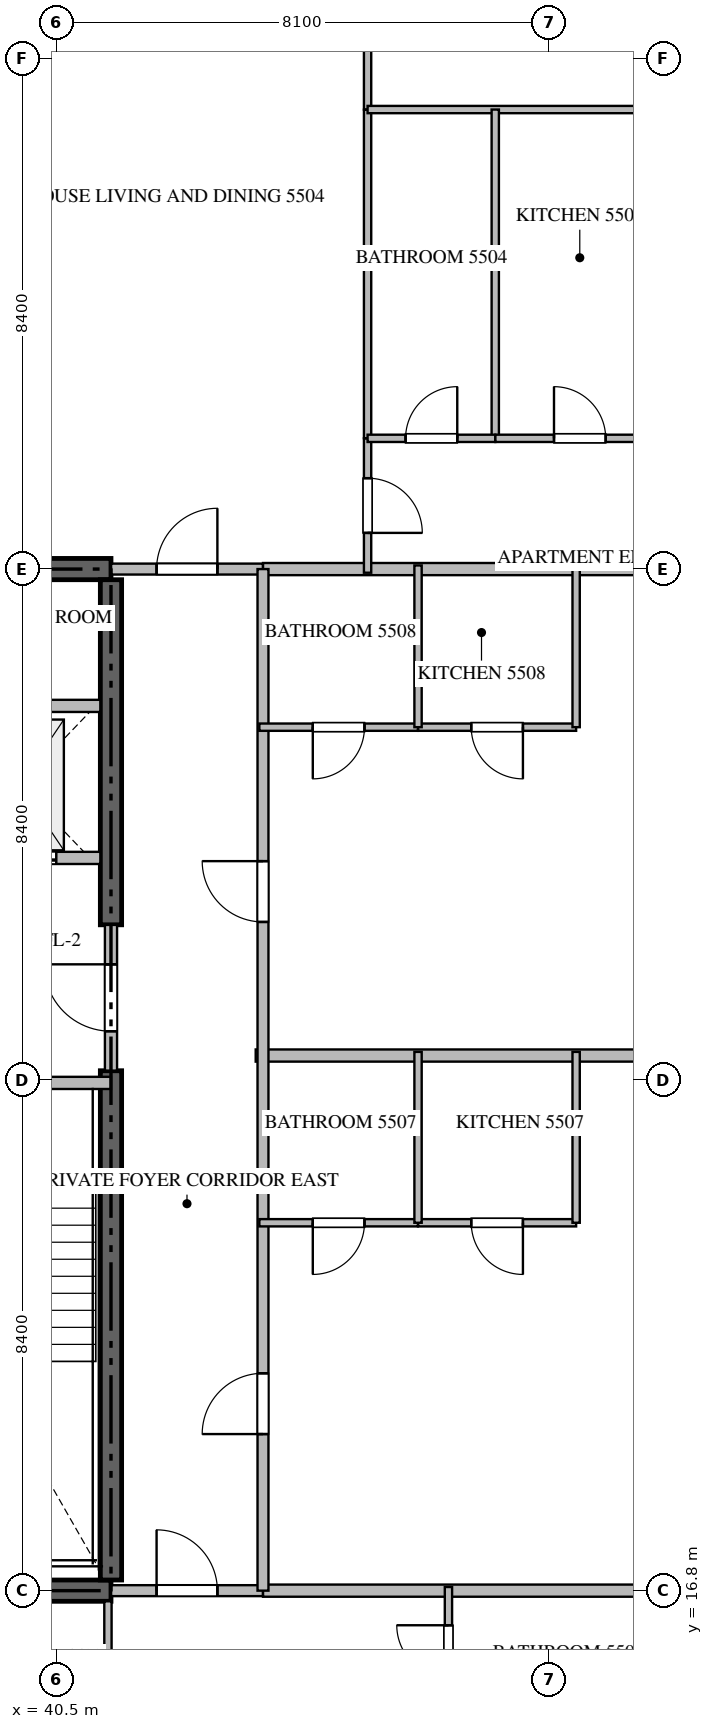
"""IFC4 building model, lengths in metres.
Left out: names, types, materials, properties, quantities, classifications, styles, units other than length and angle.
Written with IfcOpenShell. Run it as: python <this file> out.ifc"""

import sys

from ifc_helpers import new_model, si_unit, direction, frame, frame_2d, origin, place, context, subcontext, project, spatial, rectangle, extrude, source, transform, mapped, element, fill, save


model = new_model("IFC4")
c1 = context("Model", 3, precision=1e-05, world=origin(), true_north=direction((0.0, 1.0)))
c2 = subcontext(c1, "Body", "Model", "MODEL_VIEW")
j1 = project(units=[si_unit("LENGTHUNIT", "METRE"), si_unit("PLANEANGLEUNIT", "RADIAN")], contexts=[c1])
p1 = place(None, origin())
s1 = spatial("IfcSite", under=j1, at=p1, CompositionType="ELEMENT")
p2 = place(p1, origin())
s2 = spatial("IfcBuilding", under=s1, at=p2, CompositionType="ELEMENT")
p3 = place(p2, frame((0.0, 0.0, 222.0)))
s3 = spatial("IfcBuildingStorey", under=s2, at=p3, CompositionType="ELEMENT", Elevation=222.0)
for number, where, z_axis, x_axis in (
    (1, (23.4, 16.8, -0.26), (0.0, 0.0, 1.0), (1.0, 0.0, 0.0)),
    (2, (41.4, 33.6, -0.26), (0.0, 0.0, 1.0), (-1.0, 0.0, 0.0)),
):
    element("IfcWall", number, at=place(p3, frame(where, z_axis=z_axis, x_axis=x_axis)), inside=s3, PredefinedType="SHEAR", context=c2, shape_type="SweptSolid", body=[
        extrude(rectangle(XDim=18.0, YDim=0.35, at=frame_2d((9.0, 0.0))), origin(), (0.0, 0.0, 1.0), 3.848),
    ])
p4 = place(p3, frame((41.4, 16.975, -0.26), z_axis=(0.0, 0.0, 1.0), x_axis=(0.0, 1.0, 0.0)))
e3 = element("IfcWall", 3, at=p4, inside=s3, PredefinedType="SHEAR", context=c2, shape_type="SweptSolid", body=[
    extrude(rectangle(XDim=8.375, YDim=0.35, at=frame_2d((4.188, 0.0))), origin(), (0.0, 0.0, 1.0), 3.848),
])
p5 = place(p3, frame((41.4, 27.75, -0.26), z_axis=(0.0, 0.0, 1.0), x_axis=(0.0, 1.0, 0.0)))
e4 = element("IfcWall", 4, at=p5, inside=s3, PredefinedType="SHEAR", context=c2, shape_type="SweptSolid", body=[
    extrude(rectangle(XDim=5.675, YDim=0.35, at=frame_2d((2.837, 0.0))), origin(), (0.0, 0.0, 1.0), 3.848),
])
p6 = place(p3, frame((36.95, 25.15, 0.0), z_axis=(0.0, 0.0, 1.0), x_axis=(1.0, 0.0, 0.0)))
e5 = element("IfcWall", 5, at=p6, inside=s3, PredefinedType="STANDARD", context=c2, shape_type="SweptSolid", body=[
    extrude(rectangle(XDim=4.45, YDim=0.2, at=frame_2d((2.225, 0.0))), origin(), (0.0, 0.0, 1.0), 3.59),
])
p7 = place(p6, frame((1.65, 0.0, 0.0)))
e6 = element("IfcOpeningElement", 6, at=p7, cuts=e5, PredefinedType="OPENING", context=c2, shape_type="SweptSolid", body=[
    extrude(rectangle(XDim=1.1, YDim=2.15, at=frame_2d((0.55, 1.075))), frame((0.0, 0.11, 0.0), z_axis=(0.0, -1.0, 0.0), x_axis=(1.0, 0.0, 0.0)), (0.0, 0.0, 1.0), 0.22),
])
p8 = place(p3, frame((38.75, 28.85, 0.0), z_axis=(0.0, 0.0, 1.0), x_axis=(1.0, 0.0, 0.0)))
e7 = element("IfcWall", 7, at=p8, inside=s3, PredefinedType="STANDARD", context=c2, shape_type="SweptSolid", body=[
    extrude(rectangle(XDim=2.475, YDim=0.2, at=frame_2d((1.238, 0.0))), origin(), (0.0, 0.0, 1.0), 3.59),
])
p9 = place(p8, frame((0.55, 0.0, 0.0)))
e8 = element("IfcOpeningElement", 8, at=p9, cuts=e7, PredefinedType="OPENING", context=c2, shape_type="SweptSolid", body=[
    extrude(rectangle(XDim=1.2, YDim=2.2, at=frame_2d((0.6, 1.1))), frame((0.0, 0.11, 0.0), z_axis=(0.0, -1.0, 0.0), x_axis=(1.0, 0.0, 0.0)), (0.0, 0.0, 1.0), 0.22),
])
p10 = place(p3, frame((38.75, 31.35, 0.0), z_axis=(0.0, 0.0, 1.0), x_axis=(1.0, 0.0, 0.0)))
e9 = element("IfcWall", 9, at=p10, inside=s3, PredefinedType="STANDARD", context=c2, shape_type="SweptSolid", body=[
    extrude(rectangle(XDim=2.475, YDim=0.2, at=frame_2d((1.238, 0.0))), origin(), (0.0, 0.0, 1.0), 3.59),
])
p11 = place(p3, frame((41.4, 25.352, 0.0), z_axis=(0.0, 0.0, 1.0), x_axis=(0.0, 1.0, 0.0)))
e10 = element("IfcWall", 10, at=p11, inside=s3, PredefinedType="STANDARD", context=c2, shape_type="SweptSolid", body=[
    extrude(rectangle(XDim=2.396, YDim=0.2, at=frame_2d((1.198, 0.0))), origin(), (0.0, 0.0, 1.0), 3.59),
])
p12 = place(p11, frame((0.648, 0.0, 0.0)))
e11 = element("IfcOpeningElement", 11, at=p12, cuts=e10, PredefinedType="OPENING", context=c2, shape_type="SweptSolid", body=[
    extrude(rectangle(XDim=1.1, YDim=2.15, at=frame_2d((0.55, 1.075))), frame((0.0, 0.11, 0.0), z_axis=(0.0, -1.0, 0.0), x_axis=(1.0, 0.0, 0.0)), (0.0, 0.0, 1.0), 0.22),
])
p13 = place(p3, frame((43.78, 25.6, 0.0), z_axis=(0.0, 0.0, 1.0), x_axis=(1.0, 0.0, 0.0)))
e12 = element("IfcWall", 12, at=p13, inside=s3, PredefinedType="PARTITIONING", context=c2, shape_type="SweptSolid", body=[
    extrude(rectangle(XDim=13.538, YDim=0.2, at=frame_2d((6.769, 0.0))), origin(), (0.0, 0.0, 1.0), 3.59),
])
for number, where, z_axis, x_axis in (
    (13, (43.9, 16.8, 0.0), (0.0, 0.0, 1.0), (1.0, 0.0, 0.0)),
    (14, (43.9, 33.6, 0.0), (0.0, 0.0, 1.0), (1.0, 0.0, 0.0)),
):
    element("IfcWall", number, at=place(p3, frame(where, z_axis=z_axis, x_axis=x_axis)), inside=s3, PredefinedType="PARTITIONING", context=c2, shape_type="SweptSolid", body=[
        extrude(rectangle(XDim=13.418, YDim=0.2, at=frame_2d((6.709, 0.0))), origin(), (0.0, 0.0, 1.0), 3.59),
    ])
p14 = place(p3, frame((41.402, 16.8, 0.0), z_axis=(0.0, 0.0, 1.0), x_axis=(1.0, 0.0, 0.0)))
e15 = element("IfcWall", 15, at=p14, inside=s3, PredefinedType="PARTITIONING", context=c2, shape_type="SweptSolid", body=[
    extrude(rectangle(XDim=2.496, YDim=0.18, at=frame_2d((1.248, 0.0))), origin(), (0.0, 0.0, 1.0), 3.59),
])
p15 = place(p14, frame((0.748, 0.0, 0.0)))
e16 = element("IfcOpeningElement", 16, at=p15, cuts=e15, PredefinedType="OPENING", context=c2, shape_type="SweptSolid", body=[
    extrude(rectangle(XDim=1.0, YDim=2.15, at=frame_2d((0.5, 1.075))), frame((0.0, 0.1, 0.0), z_axis=(0.0, -1.0, 0.0), x_axis=(1.0, 0.0, 0.0)), (0.0, 0.0, 1.0), 0.2),
])
p16 = place(p3, frame((41.402, 33.6, 0.0), z_axis=(0.0, 0.0, 1.0), x_axis=(1.0, 0.0, 0.0)))
e17 = element("IfcWall", 17, at=p16, inside=s3, PredefinedType="PARTITIONING", context=c2, shape_type="SweptSolid", body=[
    extrude(rectangle(XDim=2.496, YDim=0.18, at=frame_2d((1.248, 0.0))), origin(), (0.0, 0.0, 1.0), 3.59),
])
p17 = place(p16, frame((0.748, 0.0, 0.0)))
e18 = element("IfcOpeningElement", 18, at=p17, cuts=e17, PredefinedType="OPENING", context=c2, shape_type="SweptSolid", body=[
    extrude(rectangle(XDim=1.0, YDim=2.15, at=frame_2d((0.5, 1.075))), frame((0.0, 0.1, 0.0), z_axis=(0.0, -1.0, 0.0), x_axis=(1.0, 0.0, 0.0)), (0.0, 0.0, 1.0), 0.2),
])
p18 = place(p3, frame((43.9, 16.8, 0.0), z_axis=(0.0, 0.0, 1.0), x_axis=(0.0, 1.0, 0.0)))
e19 = element("IfcWall", 19, at=p18, inside=s3, PredefinedType="PARTITIONING", context=c2, shape_type="SweptSolid", body=[
    extrude(rectangle(XDim=16.8, YDim=0.18, at=frame_2d((8.4, 0.0))), origin(), (0.0, 0.0, 1.0), 3.59),
])
p19 = place(p18, frame((2.575, 0.0, 0.0)))
e20 = element("IfcOpeningElement", 20, at=p19, cuts=e19, PredefinedType="OPENING", context=c2, shape_type="SweptSolid", body=[
    extrude(rectangle(XDim=1.0, YDim=2.15, at=frame_2d((0.5, 1.075))), frame((0.0, 0.1, 0.0), z_axis=(0.0, -1.0, 0.0), x_axis=(1.0, 0.0, 0.0)), (0.0, 0.0, 1.0), 0.2),
])
p20 = place(p18, frame((10.997, 0.0, 0.0)))
e21 = element("IfcOpeningElement", 21, at=p20, cuts=e19, PredefinedType="OPENING", context=c2, shape_type="SweptSolid", body=[
    extrude(rectangle(XDim=1.0, YDim=2.15, at=frame_2d((0.5, 1.075))), frame((0.0, 0.1, 0.0), z_axis=(0.0, -1.0, 0.0), x_axis=(1.0, 0.0, 0.0)), (0.0, 0.0, 1.0), 0.2),
])
p21 = place(p3, frame((41.35, 14.05, 0.0), z_axis=(0.0, 0.0, 1.0), x_axis=(0.0, 1.0, 0.0)))
e22 = element("IfcWall", 22, at=p21, inside=s3, PredefinedType="PARTITIONING", context=c2, shape_type="SweptSolid", body=[
    extrude(rectangle(XDim=2.575, YDim=0.12, at=frame_2d((1.288, 0.0))), origin(), (0.0, 0.0, 1.0), 3.59),
])
p22 = place(p3, frame((46.95, 14.752, 0.0), z_axis=(0.0, 0.0, 1.0), x_axis=(0.0, 1.0, 0.0)))
e23 = element("IfcWall", 23, at=p22, inside=s3, PredefinedType="PARTITIONING", context=c2, shape_type="SweptSolid", body=[
    extrude(rectangle(XDim=2.108, YDim=0.12, at=frame_2d((1.054, 0.0))), origin(), (0.0, 0.0, 1.0), 3.59),
])
p23 = place(p22, frame((0.629, 0.0, 0.0)))
e24 = element("IfcOpeningElement", 24, at=p23, cuts=e23, PredefinedType="OPENING", context=c2, shape_type="SweptSolid", body=[
    extrude(rectangle(XDim=0.85, YDim=2.1, at=frame_2d((0.425, 1.05))), frame((0.0, 0.07, 0.0), z_axis=(0.0, -1.0, 0.0), x_axis=(1.0, 0.0, 0.0)), (0.0, 0.0, 1.0), 0.14),
])
p24 = place(p3, frame((45.62, 35.75, 0.0), z_axis=(0.0, 0.0, 1.0), x_axis=(0.0, -1.0, 0.0)))
e25 = element("IfcWall", 25, at=p24, inside=s3, PredefinedType="PARTITIONING", context=c2, shape_type="SweptSolid", body=[
    extrude(rectangle(XDim=2.21, YDim=0.12, at=frame_2d((1.105, 0.0))), origin(), (0.0, 0.0, 1.0), 3.59),
])
p25 = place(p24, frame((0.655, 0.0, 0.0)))
e26 = element("IfcOpeningElement", 26, at=p25, cuts=e25, PredefinedType="OPENING", context=c2, shape_type="SweptSolid", body=[
    extrude(rectangle(XDim=0.9, YDim=2.1, at=frame_2d((0.45, 1.05))), frame((0.0, 0.07, 0.0), z_axis=(0.0, -1.0, 0.0), x_axis=(1.0, 0.0, 0.0)), (0.0, 0.0, 1.0), 0.14),
])
p26 = place(p3, frame((45.62, 49.105, 0.0), z_axis=(0.0, 0.0, 1.0), x_axis=(0.0, -1.0, 0.0)))
e27 = element("IfcWall", 27, at=p26, inside=s3, PredefinedType="PARTITIONING", context=c2, shape_type="SweptSolid", body=[
    extrude(rectangle(XDim=7.948, YDim=0.12, at=frame_2d((3.974, 0.0))), origin(), (0.0, 0.0, 1.0), 3.59),
])
p27 = place(p26, frame((3.876, 0.0, 0.0)))
e28 = element("IfcOpeningElement", 28, at=p27, cuts=e27, PredefinedType="OPENING", context=c2, shape_type="SweptSolid", body=[
    extrude(rectangle(XDim=0.9, YDim=2.1, at=frame_2d((0.45, 1.05))), frame((0.0, 0.07, 0.0), z_axis=(0.0, -1.0, 0.0), x_axis=(1.0, 0.0, 0.0)), (0.0, 0.0, 1.0), 0.14),
])
p28 = place(p3, frame((45.62, 41.155, 0.0), z_axis=(0.0, 0.0, 1.0), x_axis=(0.0, -1.0, 0.0)))
e29 = element("IfcWall", 29, at=p28, inside=s3, PredefinedType="PARTITIONING", context=c2, shape_type="SweptSolid", body=[
    extrude(rectangle(XDim=5.403, YDim=0.12, at=frame_2d((2.702, 0.0))), origin(), (0.0, 0.0, 1.0), 3.59),
])
p29 = place(p3, frame((45.62, 41.157, 0.0), z_axis=(0.0, 0.0, 1.0), x_axis=(1.0, 0.0, 0.0)))
e30 = element("IfcWall", 30, at=p29, inside=s3, PredefinedType="PARTITIONING", context=c2, shape_type="SweptSolid", body=[
    extrude(rectangle(XDim=4.88, YDim=0.12, at=frame_2d((2.44, 0.0))), origin(), (0.0, 0.0, 1.0), 3.59),
])
p30 = place(p3, frame((47.72, 41.157, 0.0), z_axis=(0.0, 0.0, 1.0), x_axis=(0.0, -1.0, 0.0)))
e31 = element("IfcWall", 31, at=p30, inside=s3, PredefinedType="PARTITIONING", context=c2, shape_type="SweptSolid", body=[
    extrude(rectangle(XDim=5.407, YDim=0.12, at=frame_2d((2.704, 0.0))), origin(), (0.0, 0.0, 1.0), 3.59),
])
p31 = place(p3, frame((45.62, 35.75, 0.0), z_axis=(0.0, 0.0, 1.0), x_axis=(1.0, 0.0, 0.0)))
e32 = element("IfcWall", 32, at=p31, inside=s3, PredefinedType="PARTITIONING", context=c2, shape_type="SweptSolid", body=[
    extrude(rectangle(XDim=2.1, YDim=0.12, at=frame_2d((1.05, 0.0))), origin(), (0.0, 0.0, 1.0), 3.59),
])
p32 = place(p31, frame((0.625, 0.0, 0.0)))
e33 = element("IfcOpeningElement", 33, at=p32, cuts=e32, PredefinedType="OPENING", context=c2, shape_type="SweptSolid", body=[
    extrude(rectangle(XDim=0.85, YDim=2.1, at=frame_2d((0.425, 1.05))), frame((0.0, 0.07, 0.0), z_axis=(0.0, -1.0, 0.0), x_axis=(1.0, 0.0, 0.0)), (0.0, 0.0, 1.0), 0.14),
])
p33 = place(p3, frame((47.722, 35.75, 0.0), z_axis=(0.0, 0.0, 1.0), x_axis=(1.0, 0.0, 0.0)))
e34 = element("IfcWall", 34, at=p33, inside=s3, PredefinedType="PARTITIONING", context=c2, shape_type="SweptSolid", body=[
    extrude(rectangle(XDim=2.778, YDim=0.12, at=frame_2d((1.389, 0.0))), origin(), (0.0, 0.0, 1.0), 3.59),
])
p34 = place(p33, frame((0.964, 0.0, 0.0)))
e35 = element("IfcOpeningElement", 35, at=p34, cuts=e34, PredefinedType="OPENING", context=c2, shape_type="SweptSolid", body=[
    extrude(rectangle(XDim=0.85, YDim=2.1, at=frame_2d((0.425, 1.05))), frame((0.0, 0.07, 0.0), z_axis=(0.0, -1.0, 0.0), x_axis=(1.0, 0.0, 0.0)), (0.0, 0.0, 1.0), 0.14),
])
p35 = place(p3, frame((49.05, 22.85, 0.0), z_axis=(0.0, 0.0, 1.0), x_axis=(-1.0, 0.0, 0.0)))
e36 = element("IfcWall", 36, at=p35, inside=s3, PredefinedType="PARTITIONING", context=c2, shape_type="SweptSolid", body=[
    extrude(rectangle(XDim=2.6, YDim=0.12, at=frame_2d((1.3, 0.0))), origin(), (0.0, 0.0, 1.0), 3.59),
])
p36 = place(p35, frame((0.875, 0.0, 0.0)))
e37 = element("IfcOpeningElement", 37, at=p36, cuts=e36, PredefinedType="OPENING", context=c2, shape_type="SweptSolid", body=[
    extrude(rectangle(XDim=0.85, YDim=2.1, at=frame_2d((0.425, 1.05))), frame((0.0, 0.07, 0.0), z_axis=(0.0, -1.0, 0.0), x_axis=(1.0, 0.0, 0.0)), (0.0, 0.0, 1.0), 0.14),
])
p37 = place(p3, frame((46.448, 22.85, 0.0), z_axis=(0.0, 0.0, 1.0), x_axis=(-1.0, 0.0, 0.0)))
e38 = element("IfcWall", 38, at=p37, inside=s3, PredefinedType="PARTITIONING", context=c2, shape_type="SweptSolid", body=[
    extrude(rectangle(XDim=2.608, YDim=0.12, at=frame_2d((1.304, 0.0))), origin(), (0.0, 0.0, 1.0), 3.59),
])
p38 = place(p37, frame((0.879, 0.0, 0.0)))
e39 = element("IfcOpeningElement", 39, at=p38, cuts=e38, PredefinedType="OPENING", context=c2, shape_type="SweptSolid", body=[
    extrude(rectangle(XDim=0.85, YDim=2.1, at=frame_2d((0.425, 1.05))), frame((0.0, 0.07, 0.0), z_axis=(0.0, -1.0, 0.0), x_axis=(1.0, 0.0, 0.0)), (0.0, 0.0, 1.0), 0.14),
])
for number, where, z_axis, x_axis in (
    (40, (46.45, 22.85, 0.0), (0.0, 0.0, 1.0), (0.0, 1.0, 0.0)),
    (41, (49.05, 22.85, 0.0), (0.0, 0.0, 1.0), (0.0, 1.0, 0.0)),
):
    element("IfcWall", number, at=place(p3, frame(where, z_axis=z_axis, x_axis=x_axis)), inside=s3, PredefinedType="PARTITIONING", context=c2, shape_type="SweptSolid", body=[
        extrude(rectangle(XDim=2.81, YDim=0.12, at=frame_2d((1.405, 0.0))), origin(), (0.0, 0.0, 1.0), 3.59),
    ])
p39 = place(p3, frame((49.05, 31.0, 0.0), z_axis=(0.0, 0.0, 1.0), x_axis=(-1.0, 0.0, 0.0)))
e42 = element("IfcWall", 42, at=p39, inside=s3, PredefinedType="PARTITIONING", context=c2, shape_type="SweptSolid", body=[
    extrude(rectangle(XDim=2.6, YDim=0.12, at=frame_2d((1.3, 0.0))), origin(), (0.0, 0.0, 1.0), 3.59),
])
p40 = place(p39, frame((0.875, 0.0, 0.0)))
e43 = element("IfcOpeningElement", 43, at=p40, cuts=e42, PredefinedType="OPENING", context=c2, shape_type="SweptSolid", body=[
    extrude(rectangle(XDim=0.85, YDim=2.1, at=frame_2d((0.425, 1.05))), frame((0.0, 0.07, 0.0), z_axis=(0.0, -1.0, 0.0), x_axis=(1.0, 0.0, 0.0)), (0.0, 0.0, 1.0), 0.14),
])
p41 = place(p3, frame((46.448, 31.0, 0.0), z_axis=(0.0, 0.0, 1.0), x_axis=(-1.0, 0.0, 0.0)))
e44 = element("IfcWall", 44, at=p41, inside=s3, PredefinedType="PARTITIONING", context=c2, shape_type="SweptSolid", body=[
    extrude(rectangle(XDim=2.608, YDim=0.12, at=frame_2d((1.304, 0.0))), origin(), (0.0, 0.0, 1.0), 3.59),
])
p42 = place(p41, frame((0.879, 0.0, 0.0)))
e45 = element("IfcOpeningElement", 45, at=p42, cuts=e44, PredefinedType="OPENING", context=c2, shape_type="SweptSolid", body=[
    extrude(rectangle(XDim=0.85, YDim=2.1, at=frame_2d((0.425, 1.05))), frame((0.0, 0.07, 0.0), z_axis=(0.0, -1.0, 0.0), x_axis=(1.0, 0.0, 0.0)), (0.0, 0.0, 1.0), 0.14),
])
for number, where, z_axis, x_axis in (
    (46, (46.45, 31.0, 0.0), (0.0, 0.0, 1.0), (0.0, 1.0, 0.0)),
    (47, (49.05, 31.0, 0.0), (0.0, 0.0, 1.0), (0.0, 1.0, 0.0)),
):
    element("IfcWall", number, at=place(p3, frame(where, z_axis=z_axis, x_axis=x_axis)), inside=s3, PredefinedType="PARTITIONING", context=c2, shape_type="SweptSolid", body=[
        extrude(rectangle(XDim=2.66, YDim=0.12, at=frame_2d((1.33, 0.0))), origin(), (0.0, 0.0, 1.0), 3.59),
    ])
m1 = source(origin(), c2, "Body", "SweptSolid", [
    extrude(rectangle(XDim=1.2, YDim=2.2, at=frame_2d((0.6, 1.1))), frame((0.0, 0.025, 0.0), z_axis=(0.0, -1.0, 0.0), x_axis=(1.0, 0.0, 0.0)), (0.0, 0.0, 1.0), 0.05),
])
p43 = place(p9, origin())
e48 = element("IfcDoor", 48, at=p43, inside=s3, OperationType="DOUBLE_DOOR_SLIDING", PredefinedType="DOOR", context=c2, shape_type="MappedRepresentation", body=[
    mapped(m1, transform((0.0, 0.0, 0.0), scale=1.0)),
])
fill(e8, e48)
m2 = source(origin(), c2, "Body", "SweptSolid", [
    extrude(rectangle(XDim=1.1, YDim=2.15, at=frame_2d((0.55, 1.075))), frame((0.0, 0.025, 0.0), z_axis=(0.0, -1.0, 0.0), x_axis=(1.0, 0.0, 0.0)), (0.0, 0.0, 1.0), 0.05),
])
p44 = place(p12, origin())
e49 = element("IfcDoor", 49, at=p44, inside=s3, OperationType="SINGLE_SWING_RIGHT", PredefinedType="DOOR", context=c2, shape_type="MappedRepresentation", body=[
    mapped(m2, transform((0.0, 0.0, 0.0), scale=1.0)),
])
fill(e11, e49)
m3 = source(origin(), c2, "Body", "SweptSolid", [
    extrude(rectangle(XDim=1.0, YDim=2.15, at=frame_2d((0.5, 1.075))), frame((0.0, 0.025, 0.0), z_axis=(0.0, -1.0, 0.0), x_axis=(1.0, 0.0, 0.0)), (0.0, 0.0, 1.0), 0.05),
])
p45 = place(p15, origin())
e50 = element("IfcDoor", 50, at=p45, inside=s3, OperationType="SINGLE_SWING_LEFT", PredefinedType="DOOR", context=c2, shape_type="MappedRepresentation", body=[
    mapped(m3, transform((0.0, 0.0, 0.0), scale=1.0)),
])
fill(e16, e50)
p46 = place(p17, origin())
e51 = element("IfcDoor", 51, at=p46, inside=s3, OperationType="SINGLE_SWING_RIGHT", PredefinedType="DOOR", context=c2, shape_type="MappedRepresentation", body=[
    mapped(m3, transform((0.0, 0.0, 0.0), scale=1.0)),
])
fill(e18, e51)
p47 = place(p19, origin())
e52 = element("IfcDoor", 52, at=p47, inside=s3, OperationType="SINGLE_SWING_LEFT", PredefinedType="DOOR", context=c2, shape_type="MappedRepresentation", body=[
    mapped(m3, transform((0.0, 0.0, 0.0), scale=1.0)),
])
fill(e20, e52)
p48 = place(p20, origin())
e53 = element("IfcDoor", 53, at=p48, inside=s3, OperationType="SINGLE_SWING_RIGHT", PredefinedType="DOOR", context=c2, shape_type="MappedRepresentation", body=[
    mapped(m3, transform((0.0, 0.0, 0.0), scale=1.0)),
])
fill(e21, e53)
m4 = source(origin(), c2, "Body", "SweptSolid", [
    extrude(rectangle(XDim=0.85, YDim=2.1, at=frame_2d((0.425, 1.05))), frame((0.0, 0.025, 0.0), z_axis=(0.0, -1.0, 0.0), x_axis=(1.0, 0.0, 0.0)), (0.0, 0.0, 1.0), 0.05),
])
p49 = place(p23, origin())
e54 = element("IfcDoor", 54, at=p49, inside=s3, OperationType="SINGLE_SWING_RIGHT", PredefinedType="DOOR", context=c2, shape_type="MappedRepresentation", body=[
    mapped(m4, transform((0.0, 0.0, 0.0), scale=1.0)),
])
fill(e24, e54)
m5 = source(origin(), c2, "Body", "SweptSolid", [
    extrude(rectangle(XDim=0.9, YDim=2.1, at=frame_2d((0.45, 1.05))), frame((0.0, 0.025, 0.0), z_axis=(0.0, -1.0, 0.0), x_axis=(1.0, 0.0, 0.0)), (0.0, 0.0, 1.0), 0.05),
])
p50 = place(p25, origin())
e55 = element("IfcDoor", 55, at=p50, inside=s3, OperationType="SINGLE_SWING_RIGHT", PredefinedType="DOOR", context=c2, shape_type="MappedRepresentation", body=[
    mapped(m5, transform((0.0, 0.0, 0.0), scale=1.0)),
])
fill(e26, e55)
p51 = place(p32, origin())
e56 = element("IfcDoor", 56, at=p51, inside=s3, OperationType="SINGLE_SWING_RIGHT", PredefinedType="DOOR", context=c2, shape_type="MappedRepresentation", body=[
    mapped(m4, transform((0.0, 0.0, 0.0), scale=1.0)),
])
fill(e33, e56)
p52 = place(p34, origin())
e57 = element("IfcDoor", 57, at=p52, inside=s3, OperationType="SINGLE_SWING_LEFT", PredefinedType="DOOR", context=c2, shape_type="MappedRepresentation", body=[
    mapped(m4, transform((0.0, 0.0, 0.0), scale=1.0)),
])
fill(e35, e57)
p53 = place(p36, origin())
e58 = element("IfcDoor", 58, at=p53, inside=s3, OperationType="SINGLE_SWING_LEFT", PredefinedType="DOOR", context=c2, shape_type="MappedRepresentation", body=[
    mapped(m4, transform((0.0, 0.0, 0.0), scale=1.0)),
])
fill(e37, e58)
p54 = place(p38, origin())
e59 = element("IfcDoor", 59, at=p54, inside=s3, OperationType="SINGLE_SWING_RIGHT", PredefinedType="DOOR", context=c2, shape_type="MappedRepresentation", body=[
    mapped(m4, transform((0.0, 0.0, 0.0), scale=1.0)),
])
fill(e39, e59)
p55 = place(p40, origin())
e60 = element("IfcDoor", 60, at=p55, inside=s3, OperationType="SINGLE_SWING_LEFT", PredefinedType="DOOR", context=c2, shape_type="MappedRepresentation", body=[
    mapped(m4, transform((0.0, 0.0, 0.0), scale=1.0)),
])
fill(e43, e60)
p56 = place(p42, origin())
e61 = element("IfcDoor", 61, at=p56, inside=s3, OperationType="SINGLE_SWING_RIGHT", PredefinedType="DOOR", context=c2, shape_type="MappedRepresentation", body=[
    mapped(m4, transform((0.0, 0.0, 0.0), scale=1.0)),
])
fill(e45, e61)
save(model, sys.argv[1])
